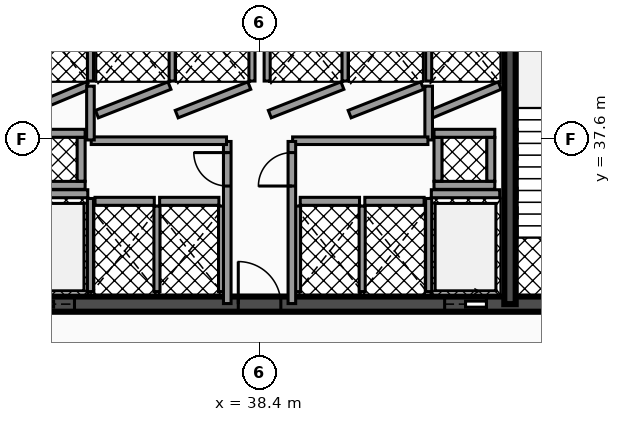
"""IFC4 building model, lengths in metres.
Left out: names, types, materials, properties, quantities, classifications, styles, units other than length and angle.
Written with IfcOpenShell. Run it as: python <this file> out.ifc"""

import sys

from ifc_helpers import new_model, si_unit, direction, frame, frame_2d, origin, place, context, subcontext, project, spatial, rectangle, extrude, element, fill, save


model = new_model("IFC4")
c1 = context("Model", 3, precision=1e-05, world=origin(), true_north=direction((0.0, 1.0)))
c2 = subcontext(c1, "Body", "Model", "MODEL_VIEW")
j1 = project(units=[si_unit("LENGTHUNIT", "METRE"), si_unit("PLANEANGLEUNIT", "RADIAN")], contexts=[c1])
p1 = place(None, origin())
s1 = spatial("IfcSite", under=j1, at=p1, CompositionType="ELEMENT")
p2 = place(p1, origin())
s2 = spatial("IfcBuilding", under=s1, at=p2, CompositionType="ELEMENT")
p3 = place(p2, frame((0.0, 0.0, 5.1)))
s3 = spatial("IfcBuildingStorey", under=s2, at=p3, CompositionType="ELEMENT", Elevation=5.1)
p4 = place(p3, frame((28.4, 33.25, 0.0), z_axis=(0.0, 0.0, 1.0), x_axis=(1.0, 0.0, 0.0)))
e1 = element("IfcWall", 1, at=p4, inside=s3, PredefinedType="SHEAR", context=c2, shape_type="SweptSolid", body=[
    extrude(rectangle(XDim=20.06, YDim=0.4, at=frame_2d((10.03, 0.0))), origin(), (0.0, 0.0, 1.0), 4.14),
])
p5 = place(p4, frame((4.03, 0.0, 0.0)))
e2 = element("IfcOpeningElement", 2, at=p5, cuts=e1, PredefinedType="OPENING", context=c2, shape_type="SweptSolid", body=[
    extrude(rectangle(XDim=1.1, YDim=2.15, at=frame_2d((0.55, 1.075))), frame((0.0, 0.21, 0.0), z_axis=(0.0, -1.0, 0.0), x_axis=(1.0, 0.0, 0.0)), (0.0, 0.0, 1.0), 0.42),
])
p6 = place(p4, frame((14.87, 0.0, 0.0)))
e3 = element("IfcOpeningElement", 3, at=p6, cuts=e1, PredefinedType="OPENING", context=c2, shape_type="SweptSolid", body=[
    extrude(rectangle(XDim=1.1, YDim=2.15, at=frame_2d((0.55, 1.075))), frame((0.0, 0.21, 0.0), z_axis=(0.0, -1.0, 0.0), x_axis=(1.0, 0.0, 0.0)), (0.0, 0.0, 1.0), 0.42),
])
p7 = place(p4, frame((1.31, 0.0, 0.0)))
e4 = element("IfcOpeningElement", 4, at=p7, cuts=e1, PredefinedType="OPENING", context=c2, shape_type="SweptSolid", body=[
    extrude(rectangle(XDim=1.1, YDim=2.2, at=frame_2d((0.55, 1.1))), frame((0.0, 0.21, 0.0), z_axis=(0.0, -1.0, 0.0), x_axis=(1.0, 0.0, 0.0)), (0.0, 0.0, 1.0), 0.42),
])
p8 = place(p4, frame((9.44, 0.0, 0.0)))
e5 = element("IfcOpeningElement", 5, at=p8, cuts=e1, PredefinedType="OPENING", context=c2, shape_type="SweptSolid", body=[
    extrude(rectangle(XDim=1.12, YDim=2.05, at=frame_2d((0.56, 1.025))), frame((0.0, 0.21, 0.0), z_axis=(0.0, -1.0, 0.0), x_axis=(1.0, 0.0, 0.0)), (0.0, 0.0, 1.0), 0.42),
])
p9 = place(p4, frame((17.65, 0.0, 0.0)))
e6 = element("IfcOpeningElement", 6, at=p9, cuts=e1, PredefinedType="OPENING", context=c2, shape_type="SweptSolid", body=[
    extrude(rectangle(XDim=1.1, YDim=2.2, at=frame_2d((0.55, 1.1))), frame((0.0, 0.21, 0.0), z_axis=(0.0, -1.0, 0.0), x_axis=(1.0, 0.0, 0.0)), (0.0, 0.0, 1.0), 0.42),
])
p10 = place(p3, frame((44.99, 33.25, 0.0), z_axis=(0.0, 0.0, 1.0), x_axis=(0.0, 1.0, 0.0)))
e7 = element("IfcWall", 7, at=p10, inside=s3, PredefinedType="SHEAR", context=c2, shape_type="SweptSolid", body=[
    extrude(rectangle(XDim=10.2, YDim=0.3, at=frame_2d((5.1, 0.0))), origin(), (0.0, 0.0, 1.0), 4.14),
])
p11 = place(p3, frame((32.08, 36.155, 0.0), z_axis=(0.0, 0.0, 1.0), x_axis=(1.0, 0.0, 0.0)))
e8 = element("IfcWall", 8, at=p11, inside=s3, PredefinedType="SOLIDWALL", context=c2, shape_type="SweptSolid", body=[
    extrude(rectangle(XDim=1.8, YDim=0.21, at=frame_2d((0.9, 0.0))), origin(), (0.0, 0.0, 1.0), 3.112),
])
p12 = place(p3, frame((33.95, 33.58, 0.0), z_axis=(0.0, 0.0, 1.0), x_axis=(0.0, 1.0, 0.0)))
e9 = element("IfcWall", 9, at=p12, inside=s3, PredefinedType="SOLIDWALL", context=c2, shape_type="SweptSolid", body=[
    extrude(rectangle(XDim=2.45, YDim=0.16, at=frame_2d((1.225, 0.0))), origin(), (0.0, 0.0, 1.0), 3.112),
])
p13 = place(p3, frame((42.92, 36.155, 0.0), z_axis=(0.0, 0.0, 1.0), x_axis=(1.0, 0.0, 0.0)))
e10 = element("IfcWall", 10, at=p13, inside=s3, PredefinedType="SOLIDWALL", context=c2, shape_type="SweptSolid", body=[
    extrude(rectangle(XDim=1.8, YDim=0.21, at=frame_2d((0.9, 0.0))), origin(), (0.0, 0.0, 1.0), 3.112),
])
p14 = place(p3, frame((42.85, 33.58, 0.0), z_axis=(0.0, 0.0, 1.0), x_axis=(0.0, 1.0, 0.0)))
e11 = element("IfcWall", 11, at=p14, inside=s3, PredefinedType="SOLIDWALL", context=c2, shape_type="SweptSolid", body=[
    extrude(rectangle(XDim=2.45, YDim=0.16, at=frame_2d((1.225, 0.0))), origin(), (0.0, 0.0, 1.0), 3.112),
])
p15 = place(p3, frame((32.08, 38.25, 0.0), z_axis=(0.0, 0.0, 1.0), x_axis=(0.923062104416, 0.384650947472, 0.0)))
e12 = element("IfcWall", 12, at=p15, inside=s3, PredefinedType="SOLIDWALL", context=c2, shape_type="SweptSolid", body=[
    extrude(rectangle(XDim=1.95, YDim=0.21, at=frame_2d((0.975, 0.0))), origin(), (0.0, 0.0, 1.0), 3.112),
])
p16 = place(p3, frame((33.95, 39.12, 0.0), z_axis=(0.0, 0.0, 1.0), x_axis=(0.0, 1.0, 0.0)))
e13 = element("IfcWall", 13, at=p16, inside=s3, PredefinedType="SOLIDWALL", context=c2, shape_type="SweptSolid", body=[
    extrude(rectangle(XDim=2.21, YDim=0.16, at=frame_2d((1.105, 0.0))), origin(), (0.0, 0.0, 1.0), 3.112),
])
p17 = place(p3, frame((42.92, 38.25, 0.0), z_axis=(0.0, 0.0, 1.0), x_axis=(0.9230806271, 0.384606494839, 0.0)))
e14 = element("IfcWall", 14, at=p17, inside=s3, PredefinedType="SOLIDWALL", context=c2, shape_type="SweptSolid", body=[
    extrude(rectangle(XDim=1.95, YDim=0.21, at=frame_2d((0.975, 0.0))), origin(), (0.0, 0.0, 1.0), 3.112),
])
p18 = place(p3, frame((42.85, 39.12, 0.0), z_axis=(0.0, 0.0, 1.0), x_axis=(0.0, 1.0, 0.0)))
e15 = element("IfcWall", 15, at=p18, inside=s3, PredefinedType="SOLIDWALL", context=c2, shape_type="SweptSolid", body=[
    extrude(rectangle(XDim=2.21, YDim=0.16, at=frame_2d((1.105, 0.0))), origin(), (0.0, 0.0, 1.0), 3.112),
])
p19 = place(p3, frame((34.12, 38.25, 0.0), z_axis=(0.0, 0.0, 1.0), x_axis=(0.930804993012, 0.36551616241, 0.0)))
e16 = element("IfcWall", 16, at=p19, inside=s3, PredefinedType="SOLIDWALL", context=c2, shape_type="SweptSolid", body=[
    extrude(rectangle(XDim=2.052, YDim=0.21, at=frame_2d((1.026, 0.0))), origin(), (0.0, 0.0, 1.0), 3.112),
])
p20 = place(p3, frame((36.1, 39.12, 0.0), z_axis=(0.0, 0.0, 1.0), x_axis=(0.0, 1.0, 0.0)))
e17 = element("IfcWall", 17, at=p20, inside=s3, PredefinedType="SOLIDWALL", context=c2, shape_type="SweptSolid", body=[
    extrude(rectangle(XDim=2.21, YDim=0.16, at=frame_2d((1.105, 0.0))), origin(), (0.0, 0.0, 1.0), 3.112),
])
p21 = place(p3, frame((36.22, 38.25, 0.0), z_axis=(0.0, 0.0, 1.0), x_axis=(0.930804993012, 0.36551616241, 0.0)))
e18 = element("IfcWall", 18, at=p21, inside=s3, PredefinedType="SOLIDWALL", context=c2, shape_type="SweptSolid", body=[
    extrude(rectangle(XDim=2.052, YDim=0.21, at=frame_2d((1.026, 0.0))), origin(), (0.0, 0.0, 1.0), 3.112),
])
p22 = place(p3, frame((38.2, 39.12, 0.0), z_axis=(0.0, 0.0, 1.0), x_axis=(0.0, 1.0, 0.0)))
e19 = element("IfcWall", 19, at=p22, inside=s3, PredefinedType="SOLIDWALL", context=c2, shape_type="SweptSolid", body=[
    extrude(rectangle(XDim=2.21, YDim=0.16, at=frame_2d((1.105, 0.0))), origin(), (0.0, 0.0, 1.0), 3.112),
])
p23 = place(p3, frame((38.67, 38.25, 0.0), z_axis=(0.0, 0.0, 1.0), x_axis=(0.930820886763, 0.3654756856, 0.0)))
e20 = element("IfcWall", 20, at=p23, inside=s3, PredefinedType="SOLIDWALL", context=c2, shape_type="SweptSolid", body=[
    extrude(rectangle(XDim=2.052, YDim=0.21, at=frame_2d((1.026, 0.0))), origin(), (0.0, 0.0, 1.0), 3.112),
])
for number, where, z_axis, x_axis in (
    (21, (38.6, 39.12, 0.0), (0.0, 0.0, 1.0), (0.0, 1.0, 0.0)),
    (22, (40.65, 39.12, 0.0), (0.0, 0.0, 1.0), (0.0, 1.0, 0.0)),
):
    element("IfcWall", number, at=place(p3, frame(where, z_axis=z_axis, x_axis=x_axis)), inside=s3, PredefinedType="SOLIDWALL", context=c2, shape_type="SweptSolid", body=[
        extrude(rectangle(XDim=2.21, YDim=0.16, at=frame_2d((1.105, 0.0))), origin(), (0.0, 0.0, 1.0), 3.112),
    ])
p24 = place(p3, frame((40.77, 38.25, 0.0), z_axis=(0.0, 0.0, 1.0), x_axis=(0.930804993012, 0.36551616241, 0.0)))
e23 = element("IfcWall", 23, at=p24, inside=s3, PredefinedType="SOLIDWALL", context=c2, shape_type="SweptSolid", body=[
    extrude(rectangle(XDim=2.052, YDim=0.21, at=frame_2d((1.026, 0.0))), origin(), (0.0, 0.0, 1.0), 3.112),
])
p25 = place(p3, frame((34.07, 35.955, 0.0), z_axis=(0.0, 0.0, 1.0), x_axis=(1.0, 0.0, 0.0)))
e24 = element("IfcWall", 24, at=p25, inside=s3, PredefinedType="SOLIDWALL", context=c2, shape_type="SweptSolid", body=[
    extrude(rectangle(XDim=1.56, YDim=0.21, at=frame_2d((0.78, 0.0))), origin(), (0.0, 0.0, 1.0), 3.112),
])
p26 = place(p3, frame((35.7, 33.58, 0.0), z_axis=(0.0, 0.0, 1.0), x_axis=(0.0, 1.0, 0.0)))
e25 = element("IfcWall", 25, at=p26, inside=s3, PredefinedType="SOLIDWALL", context=c2, shape_type="SweptSolid", body=[
    extrude(rectangle(XDim=2.25, YDim=0.16, at=frame_2d((1.125, 0.0))), origin(), (0.0, 0.0, 1.0), 3.112),
])
p27 = place(p3, frame((35.77, 35.955, 0.0), z_axis=(0.0, 0.0, 1.0), x_axis=(1.0, 0.0, 0.0)))
e26 = element("IfcWall", 26, at=p27, inside=s3, PredefinedType="SOLIDWALL", context=c2, shape_type="SweptSolid", body=[
    extrude(rectangle(XDim=1.56, YDim=0.21, at=frame_2d((0.78, 0.0))), origin(), (0.0, 0.0, 1.0), 3.112),
])
p28 = place(p3, frame((37.4, 33.58, 0.0), z_axis=(0.0, 0.0, 1.0), x_axis=(0.0, 1.0, 0.0)))
e27 = element("IfcWall", 27, at=p28, inside=s3, PredefinedType="SOLIDWALL", context=c2, shape_type="SweptSolid", body=[
    extrude(rectangle(XDim=2.25, YDim=0.16, at=frame_2d((1.125, 0.0))), origin(), (0.0, 0.0, 1.0), 3.112),
])
p29 = place(p3, frame((39.47, 35.955, 0.0), z_axis=(0.0, 0.0, 1.0), x_axis=(1.0, 0.0, 0.0)))
e28 = element("IfcWall", 28, at=p29, inside=s3, PredefinedType="SOLIDWALL", context=c2, shape_type="SweptSolid", body=[
    extrude(rectangle(XDim=1.56, YDim=0.21, at=frame_2d((0.78, 0.0))), origin(), (0.0, 0.0, 1.0), 3.112),
])
for number, where, z_axis, x_axis in (
    (29, (39.4, 33.58, 0.0), (0.0, 0.0, 1.0), (0.0, 1.0, 0.0)),
    (30, (41.1, 33.58, 0.0), (0.0, 0.0, 1.0), (0.0, 1.0, 0.0)),
):
    element("IfcWall", number, at=place(p3, frame(where, z_axis=z_axis, x_axis=x_axis)), inside=s3, PredefinedType="SOLIDWALL", context=c2, shape_type="SweptSolid", body=[
        extrude(rectangle(XDim=2.25, YDim=0.16, at=frame_2d((1.125, 0.0))), origin(), (0.0, 0.0, 1.0), 3.112),
    ])
p30 = place(p3, frame((41.17, 35.955, 0.0), z_axis=(0.0, 0.0, 1.0), x_axis=(1.0, 0.0, 0.0)))
e31 = element("IfcWall", 31, at=p30, inside=s3, PredefinedType="SOLIDWALL", context=c2, shape_type="SweptSolid", body=[
    extrude(rectangle(XDim=1.56, YDim=0.21, at=frame_2d((0.78, 0.0))), origin(), (0.0, 0.0, 1.0), 3.112),
])
for number, where, z_axis, x_axis in (
    (32, (32.21, 36.375, 0.0), (0.0, 0.0, 1.0), (1.0, 0.0, 0.0)),
    (33, (32.21, 37.745, 0.0), (0.0, 0.0, 1.0), (1.0, 0.0, 0.0)),
):
    element("IfcWall", number, at=place(p3, frame(where, z_axis=z_axis, x_axis=x_axis)), inside=s3, PredefinedType="SOLIDWALL", context=c2, shape_type="SweptSolid", body=[
        extrude(rectangle(XDim=1.6, YDim=0.21, at=frame_2d((0.8, 0.0))), origin(), (0.0, 0.0, 1.0), 4.14),
    ])
p31 = place(p3, frame((33.705, 36.485, 0.0), z_axis=(0.0, 0.0, 1.0), x_axis=(0.0, 1.0, 0.0)))
e34 = element("IfcWall", 34, at=p31, inside=s3, PredefinedType="SOLIDWALL", context=c2, shape_type="SweptSolid", body=[
    extrude(rectangle(XDim=1.15, YDim=0.21, at=frame_2d((0.575, 0.0))), origin(), (0.0, 0.0, 1.0), 4.14),
])
for number, where, z_axis, x_axis in (
    (35, (42.99, 36.375, 0.0), (0.0, 0.0, 1.0), (1.0, 0.0, 0.0)),
    (36, (42.99, 37.745, 0.0), (0.0, 0.0, 1.0), (1.0, 0.0, 0.0)),
):
    element("IfcWall", number, at=place(p3, frame(where, z_axis=z_axis, x_axis=x_axis)), inside=s3, PredefinedType="SOLIDWALL", context=c2, shape_type="SweptSolid", body=[
        extrude(rectangle(XDim=1.6, YDim=0.21, at=frame_2d((0.8, 0.0))), origin(), (0.0, 0.0, 1.0), 4.14),
    ])
for number, where, z_axis, x_axis in (
    (37, (43.095, 36.485, 0.0), (0.0, 0.0, 1.0), (0.0, 1.0, 0.0)),
    (38, (44.485, 36.485, 0.0), (0.0, 0.0, 1.0), (0.0, 1.0, 0.0)),
):
    element("IfcWall", number, at=place(p3, frame(where, z_axis=z_axis, x_axis=x_axis)), inside=s3, PredefinedType="SOLIDWALL", context=c2, shape_type="SweptSolid", body=[
        extrude(rectangle(XDim=1.15, YDim=0.21, at=frame_2d((0.575, 0.0))), origin(), (0.0, 0.0, 1.0), 4.14),
    ])
p32 = place(p3, frame((37.55, 33.265, 0.0), z_axis=(0.0, 0.0, 1.0), x_axis=(0.0, 1.0, 0.0)))
e39 = element("IfcWall", 39, at=p32, inside=s3, PredefinedType="PARTITIONING", context=c2, shape_type="SweptSolid", body=[
    extrude(rectangle(XDim=4.265, YDim=0.2, at=frame_2d((2.133, 0.0))), origin(), (0.0, 0.0, 1.0), 3.097),
])
p33 = place(p32, frame((3.093, 0.0, 0.0)))
e40 = element("IfcOpeningElement", 40, at=p33, cuts=e39, PredefinedType="OPENING", context=c2, shape_type="SweptSolid", body=[
    extrude(rectangle(XDim=0.88, YDim=2.05, at=frame_2d((0.44, 1.025))), frame((0.0, 0.11, 0.0), z_axis=(0.0, -1.0, 0.0), x_axis=(1.0, 0.0, 0.0)), (0.0, 0.0, 1.0), 0.22),
])
p34 = place(p3, frame((33.97, 37.55, 0.0), z_axis=(0.0, 0.0, 1.0), x_axis=(1.0, 0.0, 0.0)))
e41 = element("IfcWall", 41, at=p34, inside=s3, PredefinedType="PARTITIONING", context=c2, shape_type="SweptSolid", body=[
    extrude(rectangle(XDim=3.56, YDim=0.2, at=frame_2d((1.78, 0.0))), origin(), (0.0, 0.0, 1.0), 3.097),
])
for number, where, z_axis, x_axis in (
    (42, (33.95, 37.57, 0.0), (0.0, 0.0, 1.0), (0.0, 1.0, 0.0)),
    (43, (42.85, 37.57, 0.0), (0.0, 0.0, 1.0), (0.0, 1.0, 0.0)),
):
    element("IfcWall", number, at=place(p3, frame(where, z_axis=z_axis, x_axis=x_axis)), inside=s3, PredefinedType="PARTITIONING", context=c2, shape_type="SweptSolid", body=[
        extrude(rectangle(XDim=1.415, YDim=0.2, at=frame_2d((0.708, 0.0))), origin(), (0.0, 0.0, 1.0), 3.097),
    ])
p35 = place(p3, frame((39.27, 37.55, 0.0), z_axis=(0.0, 0.0, 1.0), x_axis=(1.0, 0.0, 0.0)))
e44 = element("IfcWall", 44, at=p35, inside=s3, PredefinedType="PARTITIONING", context=c2, shape_type="SweptSolid", body=[
    extrude(rectangle(XDim=3.56, YDim=0.2, at=frame_2d((1.78, 0.0))), origin(), (0.0, 0.0, 1.0), 3.097),
])
p36 = place(p3, frame((39.25, 33.265, 0.0), z_axis=(0.0, 0.0, 1.0), x_axis=(0.0, 1.0, 0.0)))
e45 = element("IfcWall", 45, at=p36, inside=s3, PredefinedType="PARTITIONING", context=c2, shape_type="SweptSolid", body=[
    extrude(rectangle(XDim=4.265, YDim=0.2, at=frame_2d((2.133, 0.0))), origin(), (0.0, 0.0, 1.0), 3.097),
])
p37 = place(p36, frame((3.093, 0.0, 0.0)))
e46 = element("IfcOpeningElement", 46, at=p37, cuts=e45, PredefinedType="OPENING", context=c2, shape_type="SweptSolid", body=[
    extrude(rectangle(XDim=0.88, YDim=2.05, at=frame_2d((0.44, 1.025))), frame((0.0, 0.11, 0.0), z_axis=(0.0, -1.0, 0.0), x_axis=(1.0, 0.0, 0.0)), (0.0, 0.0, 1.0), 0.22),
])
p38 = place(p5, origin())
e47 = element("IfcDoor", 47, at=p38, inside=s3, OperationType="SLIDING_TO_LEFT", PredefinedType="DOOR", context=c2, shape_type="SweptSolid", body=[
    extrude(rectangle(XDim=1.1, YDim=2.15, at=frame_2d((0.55, 1.075))), frame((0.0, 0.025, 0.0), z_axis=(0.0, -1.0, 0.0), x_axis=(1.0, 0.0, 0.0)), (0.0, 0.0, 1.0), 0.05),
])
fill(e2, e47)
p39 = place(p6, origin())
e48 = element("IfcDoor", 48, at=p39, inside=s3, OperationType="SLIDING_TO_RIGHT", PredefinedType="DOOR", context=c2, shape_type="SweptSolid", body=[
    extrude(rectangle(XDim=1.1, YDim=2.15, at=frame_2d((0.55, 1.075))), frame((0.0, 0.025, 0.0), z_axis=(0.0, -1.0, 0.0), x_axis=(1.0, 0.0, 0.0)), (0.0, 0.0, 1.0), 0.05),
])
fill(e3, e48)
p40 = place(p8, origin())
e49 = element("IfcDoor", 49, at=p40, inside=s3, OperationType="SINGLE_SWING_LEFT", PredefinedType="DOOR", context=c2, shape_type="SweptSolid", body=[
    extrude(rectangle(XDim=1.12, YDim=2.05, at=frame_2d((0.56, 1.025))), frame((0.0, 0.025, 0.0), z_axis=(0.0, -1.0, 0.0), x_axis=(1.0, 0.0, 0.0)), (0.0, 0.0, 1.0), 0.05),
])
fill(e5, e49)
p41 = place(p33, origin())
e50 = element("IfcDoor", 50, at=p41, inside=s3, OperationType="SINGLE_SWING_RIGHT", PredefinedType="DOOR", context=c2, shape_type="SweptSolid", body=[
    extrude(rectangle(XDim=0.88, YDim=2.05, at=frame_2d((0.44, 1.025))), frame((0.0, 0.025, 0.0), z_axis=(0.0, -1.0, 0.0), x_axis=(1.0, 0.0, 0.0)), (0.0, 0.0, 1.0), 0.05),
])
fill(e40, e50)
p42 = place(p37, origin())
e51 = element("IfcDoor", 51, at=p42, inside=s3, OperationType="SINGLE_SWING_LEFT", PredefinedType="DOOR", context=c2, shape_type="SweptSolid", body=[
    extrude(rectangle(XDim=0.88, YDim=2.05, at=frame_2d((0.44, 1.025))), frame((0.0, 0.025, 0.0), z_axis=(0.0, -1.0, 0.0), x_axis=(1.0, 0.0, 0.0)), (0.0, 0.0, 1.0), 0.05),
])
fill(e46, e51)
save(model, sys.argv[1])
